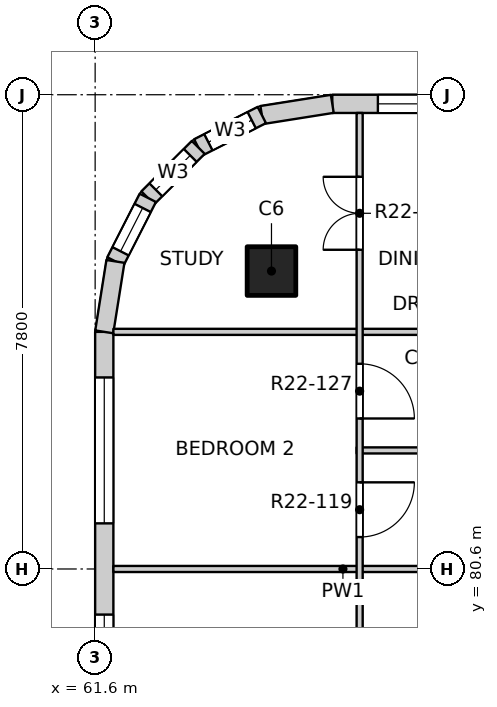
"""IFC4 building model, lengths in metres.
Left out: names, types, materials, properties, quantities, classifications, styles, units other than length and angle.
Written with IfcOpenShell. Run it as: python <this file> out.ifc"""

import sys

from ifc_helpers import new_model, si_unit, direction, frame, frame_2d, origin, origin_2d, place, context, subcontext, project, spatial, rectangle, extrude, element, fill, save


model = new_model("IFC4")
c1 = context("Model", 3, precision=1e-05, world=origin(), true_north=direction((0.0, 1.0)))
c2 = subcontext(c1, "Body", "Model", "MODEL_VIEW")
j1 = project(units=[si_unit("LENGTHUNIT", "METRE"), si_unit("PLANEANGLEUNIT", "RADIAN")], contexts=[c1])
p1 = place(None, origin())
s1 = spatial("IfcSite", under=j1, at=p1, CompositionType="ELEMENT")
p2 = place(p1, origin())
s2 = spatial("IfcBuilding", under=s1, at=p2, CompositionType="ELEMENT")
p3 = place(p2, frame((0.0, 0.0, 224.5)))
s3 = spatial("IfcBuildingStorey", under=s2, at=p3, CompositionType="ELEMENT", Elevation=224.5)
p4 = place(p3, frame((64.5, 85.5, -0.25), z_axis=(0.0, 0.0, 1.0), x_axis=(1.0, 0.0, 0.0)))
e1 = element("IfcColumn", 1, at=p4, inside=s3, PredefinedType="COLUMN", context=c2, shape_type="SweptSolid", body=[
    extrude(rectangle(XDim=0.8, YDim=0.8, at=origin_2d()), origin(), (0.0, 0.0, 1.0), 3.4),
])
p5 = place(p3, frame((65.5, 88.25, 0.0), z_axis=(0.0, 0.0, 1.0), x_axis=(1.0, 0.0, 0.0)))
e2 = element("IfcWall", 2, at=p5, inside=s3, PredefinedType="SOLIDWALL", context=c2, shape_type="SweptSolid", body=[
    extrude(rectangle(XDim=7.4, YDim=0.3, at=frame_2d((3.7, 0.0))), origin(), (0.0, 0.0, 1.0), 2.7),
])
p6 = place(p5, frame((0.75, 0.0, 0.9)))
e3 = element("IfcOpeningElement", 3, at=p6, cuts=e2, PredefinedType="OPENING", context=c2, shape_type="SweptSolid", body=[
    extrude(rectangle(XDim=2.4, YDim=1.8, at=frame_2d((1.2, 0.9))), frame((0.0, 0.16, 0.0), z_axis=(0.0, -1.0, 0.0), x_axis=(1.0, 0.0, 0.0)), (0.0, 0.0, 1.0), 0.32),
])
p7 = place(p5, frame((4.65, 0.0, 0.9)))
e4 = element("IfcOpeningElement", 4, at=p7, cuts=e2, PredefinedType="OPENING", context=c2, shape_type="SweptSolid", body=[
    extrude(rectangle(XDim=2.4, YDim=1.8, at=frame_2d((1.2, 0.9))), frame((0.0, 0.16, 0.0), z_axis=(0.0, -1.0, 0.0), x_axis=(1.0, 0.0, 0.0)), (0.0, 0.0, 1.0), 0.32),
])
p8 = place(p3, frame((61.75, 77.1, 0.0), z_axis=(0.0, 0.0, 1.0), x_axis=(0.0, 1.0, 0.0)))
e5 = element("IfcWall", 5, at=p8, inside=s3, PredefinedType="SOLIDWALL", context=c2, shape_type="SweptSolid", body=[
    extrude(rectangle(XDim=7.4, YDim=0.3, at=frame_2d((3.7, 0.0))), origin(), (0.0, 0.0, 1.0), 2.7),
])
p9 = place(p8, frame((0.35, 0.0, 0.9)))
e6 = element("IfcOpeningElement", 6, at=p9, cuts=e5, PredefinedType="OPENING", context=c2, shape_type="SweptSolid", body=[
    extrude(rectangle(XDim=2.4, YDim=1.8, at=frame_2d((1.2, 0.9))), frame((0.0, 0.16, 0.0), z_axis=(0.0, -1.0, 0.0), x_axis=(1.0, 0.0, 0.0)), (0.0, 0.0, 1.0), 0.32),
])
p10 = place(p8, frame((4.25, 0.0, 0.9)))
e7 = element("IfcOpeningElement", 7, at=p10, cuts=e5, PredefinedType="OPENING", context=c2, shape_type="SweptSolid", body=[
    extrude(rectangle(XDim=2.4, YDim=1.8, at=frame_2d((1.2, 0.9))), frame((0.0, 0.16, 0.0), z_axis=(0.0, -1.0, 0.0), x_axis=(1.0, 0.0, 0.0)), (0.0, 0.0, 1.0), 0.32),
])
p11 = place(p3, frame((65.5, 88.25, 0.0), z_axis=(0.0, 0.0, 1.0), x_axis=(-0.987678452879, -0.156496880861, 0.0)))
e8 = element("IfcWall", 8, at=p11, inside=s3, PredefinedType="SOLIDWALL", context=c2, shape_type="SweptSolid", body=[
    extrude(rectangle(XDim=1.173, YDim=0.3, at=frame_2d((0.586, 0.0))), origin(), (0.0, 0.0, 1.0), 2.7),
])
p12 = place(p3, frame((64.341, 88.066, 0.0), z_axis=(0.0, 0.0, 1.0), x_axis=(-0.890988677504, -0.454025524128, 0.0)))
e9 = element("IfcWall", 9, at=p12, inside=s3, PredefinedType="SOLIDWALL", context=c2, shape_type="SweptSolid", body=[
    extrude(rectangle(XDim=1.173, YDim=0.3, at=frame_2d((0.587, 0.0))), origin(), (0.0, 0.0, 1.0), 2.7),
])
p13 = place(p12, frame((0.187, 0.0, 0.9)))
e10 = element("IfcOpeningElement", 10, at=p13, cuts=e9, PredefinedType="OPENING", context=c2, shape_type="SweptSolid", body=[
    extrude(rectangle(XDim=0.8, YDim=1.2, at=frame_2d((0.4, 0.6))), frame((0.0, 0.16, 0.0), z_axis=(0.0, -1.0, 0.0), x_axis=(1.0, 0.0, 0.0)), (0.0, 0.0, 1.0), 0.32),
])
p14 = place(p3, frame((63.296, 87.534, 0.0), z_axis=(0.0, 0.0, 1.0), x_axis=(-0.707106781187, -0.707106781187, 0.0)))
e11 = element("IfcWall", 11, at=p14, inside=s3, PredefinedType="SOLIDWALL", context=c2, shape_type="SweptSolid", body=[
    extrude(rectangle(XDim=1.173, YDim=0.3, at=frame_2d((0.586, 0.0))), origin(), (0.0, 0.0, 1.0), 2.7),
])
p15 = place(p14, frame((0.187, 0.0, 0.9)))
e12 = element("IfcOpeningElement", 12, at=p15, cuts=e11, PredefinedType="OPENING", context=c2, shape_type="SweptSolid", body=[
    extrude(rectangle(XDim=0.8, YDim=1.2, at=frame_2d((0.4, 0.6))), frame((0.0, 0.16, 0.0), z_axis=(0.0, -1.0, 0.0), x_axis=(1.0, 0.0, 0.0)), (0.0, 0.0, 1.0), 0.32),
])
p16 = place(p3, frame((62.466, 86.704, 0.0), z_axis=(0.0, 0.0, 1.0), x_axis=(-0.454025524128, -0.890988677504, 0.0)))
e13 = element("IfcWall", 13, at=p16, inside=s3, PredefinedType="SOLIDWALL", context=c2, shape_type="SweptSolid", body=[
    extrude(rectangle(XDim=1.173, YDim=0.3, at=frame_2d((0.587, 0.0))), origin(), (0.0, 0.0, 1.0), 2.7),
])
p17 = place(p16, frame((0.187, 0.0, 0.9)))
e14 = element("IfcOpeningElement", 14, at=p17, cuts=e13, PredefinedType="OPENING", context=c2, shape_type="SweptSolid", body=[
    extrude(rectangle(XDim=0.8, YDim=1.2, at=frame_2d((0.4, 0.6))), frame((0.0, 0.16, 0.0), z_axis=(0.0, -1.0, 0.0), x_axis=(1.0, 0.0, 0.0)), (0.0, 0.0, 1.0), 0.32),
])
p18 = place(p3, frame((61.934, 85.659, 0.0), z_axis=(0.0, 0.0, 1.0), x_axis=(-0.156496880861, -0.987678452879, 0.0)))
e15 = element("IfcWall", 15, at=p18, inside=s3, PredefinedType="SOLIDWALL", context=c2, shape_type="SweptSolid", body=[
    extrude(rectangle(XDim=1.173, YDim=0.3, at=frame_2d((0.586, 0.0))), origin(), (0.0, 0.0, 1.0), 2.7),
])
p19 = place(p3, frame((61.9, 80.6, 0.0), z_axis=(0.0, 0.0, 1.0), x_axis=(1.0, 0.0, 0.0)))
e16 = element("IfcWall", 16, at=p19, inside=s3, PredefinedType="PARTITIONING", context=c2, shape_type="SweptSolid", body=[
    extrude(rectangle(XDim=7.55, YDim=0.1, at=frame_2d((3.775, 0.0))), origin(), (0.0, 0.0, 1.0), 3.15),
])
p20 = place(p3, frame((65.9, 82.55, 0.0), z_axis=(0.0, 0.0, 1.0), x_axis=(1.0, 0.0, 0.0)))
e17 = element("IfcWall", 17, at=p20, inside=s3, PredefinedType="PARTITIONING", context=c2, shape_type="SweptSolid", body=[
    extrude(rectangle(XDim=3.55, YDim=0.1, at=frame_2d((1.775, 0.0))), origin(), (0.0, 0.0, 1.0), 3.15),
])
p21 = place(p3, frame((61.9, 84.5, 0.0), z_axis=(0.0, 0.0, 1.0), x_axis=(1.0, 0.0, 0.0)))
e18 = element("IfcWall", 18, at=p21, inside=s3, PredefinedType="PARTITIONING", context=c2, shape_type="SweptSolid", body=[
    extrude(rectangle(XDim=11.5, YDim=0.1, at=frame_2d((5.75, 0.0))), origin(), (0.0, 0.0, 1.0), 3.15),
])
p22 = place(p21, frame((7.965, 0.0, 0.0)))
e19 = element("IfcOpeningElement", 19, at=p22, cuts=e18, PredefinedType="OPENING", context=c2, shape_type="SweptSolid", body=[
    extrude(rectangle(XDim=0.9, YDim=2.1, at=frame_2d((0.45, 1.05))), frame((0.0, 0.06, 0.0), z_axis=(0.0, -1.0, 0.0), x_axis=(1.0, 0.0, 0.0)), (0.0, 0.0, 1.0), 0.12),
])
p23 = place(p3, frame((65.95, 72.9, 0.0), z_axis=(0.0, 0.0, 1.0), x_axis=(0.0, 1.0, 0.0)))
e20 = element("IfcWall", 20, at=p23, inside=s3, PredefinedType="PARTITIONING", context=c2, shape_type="SweptSolid", body=[
    extrude(rectangle(XDim=15.2, YDim=0.1, at=frame_2d((7.6, 0.0))), origin(), (0.0, 0.0, 1.0), 3.15),
])
p24 = place(p23, frame((0.425, 0.0, 0.0)))
e21 = element("IfcOpeningElement", 21, at=p24, cuts=e20, PredefinedType="OPENING", context=c2, shape_type="SweptSolid", body=[
    extrude(rectangle(XDim=0.9, YDim=2.1, at=frame_2d((0.45, 1.05))), frame((0.0, 0.06, 0.0), z_axis=(0.0, -1.0, 0.0), x_axis=(1.0, 0.0, 0.0)), (0.0, 0.0, 1.0), 0.12),
])
p25 = place(p23, frame((2.375, 0.0, 0.0)))
e22 = element("IfcOpeningElement", 22, at=p25, cuts=e20, PredefinedType="OPENING", context=c2, shape_type="SweptSolid", body=[
    extrude(rectangle(XDim=0.9, YDim=2.1, at=frame_2d((0.45, 1.05))), frame((0.0, 0.06, 0.0), z_axis=(0.0, -1.0, 0.0), x_axis=(1.0, 0.0, 0.0)), (0.0, 0.0, 1.0), 0.12),
])
p26 = place(p23, frame((5.15, 0.0, 0.0)))
e23 = element("IfcOpeningElement", 23, at=p26, cuts=e20, PredefinedType="OPENING", context=c2, shape_type="SweptSolid", body=[
    extrude(rectangle(XDim=1.2, YDim=2.1, at=frame_2d((0.6, 1.05))), frame((0.0, 0.06, 0.0), z_axis=(0.0, -1.0, 0.0), x_axis=(1.0, 0.0, 0.0)), (0.0, 0.0, 1.0), 0.12),
])
p27 = place(p23, frame((8.225, 0.0, 0.0)))
e24 = element("IfcOpeningElement", 24, at=p27, cuts=e20, PredefinedType="OPENING", context=c2, shape_type="SweptSolid", body=[
    extrude(rectangle(XDim=0.9, YDim=2.1, at=frame_2d((0.45, 1.05))), frame((0.0, 0.06, 0.0), z_axis=(0.0, -1.0, 0.0), x_axis=(1.0, 0.0, 0.0)), (0.0, 0.0, 1.0), 0.12),
])
p28 = place(p23, frame((10.175, 0.0, 0.0)))
e25 = element("IfcOpeningElement", 25, at=p28, cuts=e20, PredefinedType="OPENING", context=c2, shape_type="SweptSolid", body=[
    extrude(rectangle(XDim=0.9, YDim=2.1, at=frame_2d((0.45, 1.05))), frame((0.0, 0.06, 0.0), z_axis=(0.0, -1.0, 0.0), x_axis=(1.0, 0.0, 0.0)), (0.0, 0.0, 1.0), 0.12),
])
p29 = place(p23, frame((12.95, 0.0, 0.0)))
e26 = element("IfcOpeningElement", 26, at=p29, cuts=e20, PredefinedType="OPENING", context=c2, shape_type="SweptSolid", body=[
    extrude(rectangle(XDim=1.2, YDim=2.1, at=frame_2d((0.6, 1.05))), frame((0.0, 0.06, 0.0), z_axis=(0.0, -1.0, 0.0), x_axis=(1.0, 0.0, 0.0)), (0.0, 0.0, 1.0), 0.12),
])
p30 = place(p6, origin())
e27 = element("IfcWindow", 27, at=p30, inside=s3, PartitioningType="DOUBLE_PANEL_VERTICAL", PredefinedType="WINDOW", context=c2, shape_type="SweptSolid", body=[
    extrude(rectangle(XDim=2.4, YDim=1.8, at=frame_2d((1.2, 0.9))), frame((0.0, 0.03, 0.0), z_axis=(0.0, -1.0, 0.0), x_axis=(1.0, 0.0, 0.0)), (0.0, 0.0, 1.0), 0.06),
])
fill(e3, e27)
p31 = place(p9, origin())
e28 = element("IfcWindow", 28, at=p31, inside=s3, PartitioningType="DOUBLE_PANEL_VERTICAL", PredefinedType="WINDOW", context=c2, shape_type="SweptSolid", body=[
    extrude(rectangle(XDim=2.4, YDim=1.8, at=frame_2d((1.2, 0.9))), frame((0.0, 0.03, 0.0), z_axis=(0.0, -1.0, 0.0), x_axis=(1.0, 0.0, 0.0)), (0.0, 0.0, 1.0), 0.06),
])
fill(e6, e28)
p32 = place(p10, origin())
e29 = element("IfcWindow", 29, at=p32, inside=s3, PartitioningType="DOUBLE_PANEL_VERTICAL", PredefinedType="WINDOW", context=c2, shape_type="SweptSolid", body=[
    extrude(rectangle(XDim=2.4, YDim=1.8, at=frame_2d((1.2, 0.9))), frame((0.0, 0.03, 0.0), z_axis=(0.0, -1.0, 0.0), x_axis=(1.0, 0.0, 0.0)), (0.0, 0.0, 1.0), 0.06),
])
fill(e7, e29)
p33 = place(p13, origin())
e30 = element("IfcWindow", 30, at=p33, inside=s3, PartitioningType="SINGLE_PANEL", PredefinedType="WINDOW", context=c2, shape_type="SweptSolid", body=[
    extrude(rectangle(XDim=0.8, YDim=1.2, at=frame_2d((0.4, 0.6))), frame((0.0, 0.03, 0.0), z_axis=(0.0, -1.0, 0.0), x_axis=(1.0, 0.0, 0.0)), (0.0, 0.0, 1.0), 0.06),
])
fill(e10, e30)
p34 = place(p15, origin())
e31 = element("IfcWindow", 31, at=p34, inside=s3, PartitioningType="SINGLE_PANEL", PredefinedType="WINDOW", context=c2, shape_type="SweptSolid", body=[
    extrude(rectangle(XDim=0.8, YDim=1.2, at=frame_2d((0.4, 0.6))), frame((0.0, 0.03, 0.0), z_axis=(0.0, -1.0, 0.0), x_axis=(1.0, 0.0, 0.0)), (0.0, 0.0, 1.0), 0.06),
])
fill(e12, e31)
p35 = place(p17, origin())
e32 = element("IfcWindow", 32, at=p35, inside=s3, PartitioningType="SINGLE_PANEL", PredefinedType="WINDOW", context=c2, shape_type="SweptSolid", body=[
    extrude(rectangle(XDim=0.8, YDim=1.2, at=frame_2d((0.4, 0.6))), frame((0.0, 0.03, 0.0), z_axis=(0.0, -1.0, 0.0), x_axis=(1.0, 0.0, 0.0)), (0.0, 0.0, 1.0), 0.06),
])
fill(e14, e32)
p36 = place(p27, origin())
e33 = element("IfcDoor", 33, at=p36, inside=s3, OperationType="SINGLE_SWING_LEFT", PredefinedType="DOOR", context=c2, shape_type="SweptSolid", body=[
    extrude(rectangle(XDim=0.9, YDim=2.1, at=frame_2d((0.45, 1.05))), frame((0.0, 0.025, 0.0), z_axis=(0.0, -1.0, 0.0), x_axis=(1.0, 0.0, 0.0)), (0.0, 0.0, 1.0), 0.05),
])
fill(e24, e33)
p37 = place(p28, origin())
e34 = element("IfcDoor", 34, at=p37, inside=s3, OperationType="SINGLE_SWING_RIGHT", PredefinedType="DOOR", context=c2, shape_type="SweptSolid", body=[
    extrude(rectangle(XDim=0.9, YDim=2.1, at=frame_2d((0.45, 1.05))), frame((0.0, 0.025, 0.0), z_axis=(0.0, -1.0, 0.0), x_axis=(1.0, 0.0, 0.0)), (0.0, 0.0, 1.0), 0.05),
])
fill(e25, e34)
p38 = place(p29, origin())
e35 = element("IfcDoor", 35, at=p38, inside=s3, OperationType="DOUBLE_DOOR_SINGLE_SWING", PredefinedType="DOOR", context=c2, shape_type="SweptSolid", body=[
    extrude(rectangle(XDim=1.2, YDim=2.1, at=frame_2d((0.6, 1.05))), frame((0.0, 0.025, 0.0), z_axis=(0.0, -1.0, 0.0), x_axis=(1.0, 0.0, 0.0)), (0.0, 0.0, 1.0), 0.05),
])
fill(e26, e35)
save(model, sys.argv[1])
